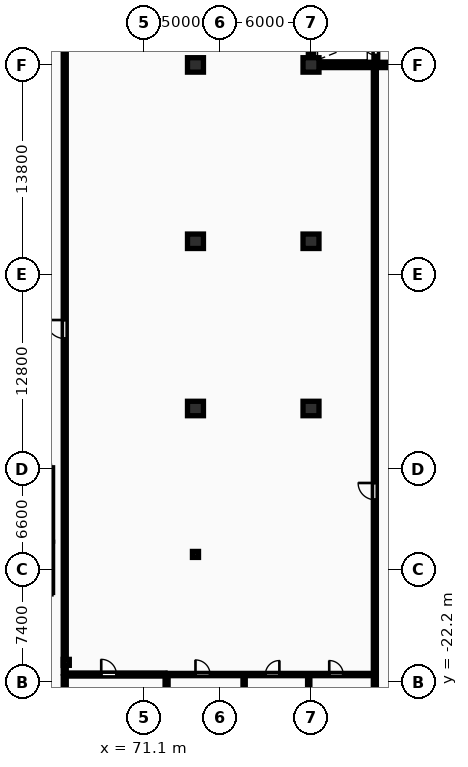
"""IFC4 building model, lengths in metres.
Left out: names, types, materials, properties, quantities, classifications, styles, units other than length and angle.
Written with IfcOpenShell. Run it as: python <this file> out.ifc"""

import sys

from ifc_helpers import new_model, si_unit, direction, frame, frame_2d, origin, origin_2d, place, context, subcontext, project, spatial, rectangle, i_section, extrude, element, fill, save


model = new_model("IFC4")
c1 = context("Model", 3, precision=1e-05, world=origin(), true_north=direction((0.0, 1.0)))
c2 = subcontext(c1, "Body", "Model", "MODEL_VIEW")
j1 = project(units=[si_unit("LENGTHUNIT", "METRE"), si_unit("PLANEANGLEUNIT", "RADIAN")], contexts=[c1])
p1 = place(None, origin())
s1 = spatial("IfcSite", under=j1, at=p1, CompositionType="ELEMENT")
p2 = place(p1, origin())
s2 = spatial("IfcBuilding", under=s1, at=p2, CompositionType="ELEMENT")
p3 = place(p2, origin())
s3 = spatial("IfcBuildingStorey", under=s2, at=p3, CompositionType="ELEMENT", Elevation=0.0)
for number, where, z_axis, x_axis in (
    (1, (74.5, -4.2, 0.0), (0.0, 0.0, 1.0), (1.0, 0.0, 0.0)),
    (2, (74.5, 6.8, 0.0), (0.0, 0.0, 1.0), (1.0, 0.0, 0.0)),
    (3, (74.5, 18.4, 0.0), (0.0, 0.0, 1.0), (1.0, 0.0, 0.0)),
    (4, (82.1, -4.2, 0.0), (0.0, 0.0, 1.0), (1.0, 0.0, 0.0)),
    (5, (82.1, 6.8, 0.0), (0.0, 0.0, 1.0), (1.0, 0.0, 0.0)),
    (6, (82.1, 18.4, 0.0), (0.0, 0.0, 1.0), (1.0, 0.0, 0.0)),
):
    element("IfcColumn", number, at=place(p3, frame(where, z_axis=z_axis, x_axis=x_axis)), inside=s3, PredefinedType="COLUMN", context=c2, shape_type="SweptSolid", body=[
        extrude(rectangle(XDim=1.05, YDim=0.95, at=origin_2d()), origin(), (0.0, 0.0, 1.0), 5.4),
    ])
for number, where, z_axis, x_axis in (
    (7, (74.5, -13.8, 0.0), (0.0, 0.0, 1.0), (1.0, 0.0, 0.0)),
    (8, (66.0, -20.9, 0.0), (0.0, 0.0, 1.0), (1.0, 0.0, 0.0)),
):
    element("IfcColumn", number, at=place(p3, frame(where, z_axis=z_axis, x_axis=x_axis)), inside=s3, PredefinedType="COLUMN", context=c2, shape_type="SweptSolid", body=[
        extrude(i_section(OverallWidth=0.399, OverallDepth=0.394, WebThickness=0.023, FlangeThickness=0.037, FilletRadius=0.015, at=origin_2d()), origin(), (0.0, 0.0, 1.0), 5.4),
    ])
p4 = place(p3, frame((82.1, 18.575, 0.0), z_axis=(0.0, 0.0, 1.0), x_axis=(0.0, 1.0, 0.0)))
e9 = element("IfcWall", 9, at=p4, inside=s3, PredefinedType="SHEAR", context=c2, shape_type="SweptSolid", body=[
    extrude(rectangle(XDim=11.65, YDim=0.35, at=frame_2d((5.825, 0.0))), origin(), (0.0, 0.0, 1.0), 5.4),
])
p5 = place(p3, frame((81.925, 18.4, 0.0), z_axis=(0.0, 0.0, 1.0), x_axis=(1.0, 0.0, 0.0)))
e10 = element("IfcWall", 10, at=p5, inside=s3, PredefinedType="SHEAR", context=c2, shape_type="SweptSolid", body=[
    extrude(rectangle(XDim=36.265, YDim=0.35, at=frame_2d((18.132, 0.0))), origin(), (0.0, 0.0, 1.0), 5.4),
])
p6 = place(p5, frame((5.675, 0.0, 0.0)))
e11 = element("IfcOpeningElement", 11, at=p6, cuts=e10, PredefinedType="OPENING", context=c2, shape_type="SweptSolid", body=[
    extrude(rectangle(XDim=1.0, YDim=2.15, at=frame_2d((0.5, 1.075))), frame((0.0, 0.185, 0.0), z_axis=(0.0, -1.0, 0.0), x_axis=(1.0, 0.0, 0.0)), (0.0, 0.0, 1.0), 0.37),
])
p7 = place(p5, frame((21.925, 0.0, 0.0)))
e12 = element("IfcOpeningElement", 12, at=p7, cuts=e10, PredefinedType="OPENING", context=c2, shape_type="SweptSolid", body=[
    extrude(rectangle(XDim=1.5, YDim=2.2, at=frame_2d((0.75, 1.1))), frame((0.0, 0.185, 0.0), z_axis=(0.0, -1.0, 0.0), x_axis=(1.0, 0.0, 0.0)), (0.0, 0.0, 1.0), 0.37),
])
p8 = place(p5, frame((29.875, 0.0, 0.0)))
e13 = element("IfcOpeningElement", 13, at=p8, cuts=e10, PredefinedType="OPENING", context=c2, shape_type="SweptSolid", body=[
    extrude(rectangle(XDim=1.0, YDim=2.15, at=frame_2d((0.5, 1.075))), frame((0.0, 0.185, 0.0), z_axis=(0.0, -1.0, 0.0), x_axis=(1.0, 0.0, 0.0)), (0.0, 0.0, 1.0), 0.37),
])
p9 = place(p3, frame((86.365, 18.6, 0.0), z_axis=(0.0, 0.0, 1.0), x_axis=(0.0, 1.0, 0.0)))
e14 = element("IfcWall", 14, at=p9, inside=s3, PredefinedType="SHEAR", context=c2, shape_type="SweptSolid", body=[
    extrude(rectangle(XDim=11.6, YDim=0.25, at=frame_2d((5.8, 0.0))), origin(), (0.0, 0.0, 1.0), 5.4),
])
p10 = place(p9, frame((0.45, 0.0, 0.0)))
e15 = element("IfcOpeningElement", 15, at=p10, cuts=e14, PredefinedType="OPENING", context=c2, shape_type="SweptSolid", body=[
    extrude(rectangle(XDim=0.85, YDim=2.05, at=frame_2d((0.425, 1.025))), frame((0.0, 0.135, 0.0), z_axis=(0.0, -1.0, 0.0), x_axis=(1.0, 0.0, 0.0)), (0.0, 0.0, 1.0), 0.27),
])
p11 = place(p9, frame((2.05, 0.0, 0.0)))
e16 = element("IfcOpeningElement", 16, at=p11, cuts=e14, PredefinedType="OPENING", context=c2, shape_type="SweptSolid", body=[
    extrude(rectangle(XDim=1.1, YDim=2.1, at=frame_2d((0.55, 1.05))), frame((0.0, 0.135, 0.0), z_axis=(0.0, -1.0, 0.0), x_axis=(1.0, 0.0, 0.0)), (0.0, 0.0, 1.0), 0.27),
])
p12 = place(p9, frame((9.95, 0.0, 0.0)))
e17 = element("IfcOpeningElement", 17, at=p12, cuts=e14, PredefinedType="OPENING", context=c2, shape_type="SweptSolid", body=[
    extrude(rectangle(XDim=0.85, YDim=2.05, at=frame_2d((0.425, 1.025))), frame((0.0, 0.135, 0.0), z_axis=(0.0, -1.0, 0.0), x_axis=(1.0, 0.0, 0.0)), (0.0, 0.0, 1.0), 0.27),
])
p13 = place(p3, frame((65.0, -12.925, 0.0), z_axis=(0.0, 0.0, 1.0), x_axis=(0.0, 1.0, 0.0)))
e18 = element("IfcWall", 18, at=p13, inside=s3, PredefinedType="PARTITIONING", context=c2, shape_type="SweptSolid", body=[
    extrude(rectangle(XDim=4.825, YDim=0.2, at=frame_2d((2.413, 0.0))), origin(), (0.0, 0.0, 1.0), 5.1),
])
p14 = place(p13, frame((1.6, 0.0, 0.0)))
e19 = element("IfcOpeningElement", 19, at=p14, cuts=e18, PredefinedType="OPENING", context=c2, shape_type="SweptSolid", body=[
    extrude(rectangle(XDim=1.1, YDim=2.15, at=frame_2d((0.55, 1.075))), frame((0.0, 0.11, 0.0), z_axis=(0.0, -1.0, 0.0), x_axis=(1.0, 0.0, 0.0)), (0.0, 0.0, 1.0), 0.22),
])
p15 = place(p3, frame((65.9, -21.7, 0.0), z_axis=(0.0, 0.0, 1.0), x_axis=(1.0, 0.0, 0.0)))
e20 = element("IfcWall", 20, at=p15, inside=s3, PredefinedType="PARTITIONING", context=c2, shape_type="SweptSolid", body=[
    extrude(rectangle(XDim=6.6, YDim=0.2, at=frame_2d((3.3, 0.0))), origin(), (0.0, 0.0, 1.0), 5.1),
])
p16 = place(p15, frame((2.4, 0.0, 0.0)))
e21 = element("IfcOpeningElement", 21, at=p16, cuts=e20, PredefinedType="OPENING", context=c2, shape_type="SweptSolid", body=[
    extrude(rectangle(XDim=1.0, YDim=2.1, at=frame_2d((0.5, 1.05))), frame((0.0, 0.11, 0.0), z_axis=(0.0, -1.0, 0.0), x_axis=(1.0, 0.0, 0.0)), (0.0, 0.0, 1.0), 0.22),
])
for number, where, z_axis, x_axis in (
    (22, (65.9, -26.2, 0.0), (0.0, 0.0, 1.0), (0.0, 1.0, 0.0)),
    (23, (72.6, -26.2, 0.0), (0.0, 0.0, 1.0), (0.0, 1.0, 0.0)),
):
    element("IfcWall", number, at=place(p3, frame(where, z_axis=z_axis, x_axis=x_axis)), inside=s3, PredefinedType="PARTITIONING", context=c2, shape_type="SweptSolid", body=[
        extrude(rectangle(XDim=4.35, YDim=0.2, at=frame_2d((2.175, 0.0))), origin(), (0.0, 0.0, 1.0), 5.1),
    ])
p17 = place(p3, frame((86.3, -26.2, 0.0), z_axis=(0.0, 0.0, 1.0), x_axis=(0.0, 1.0, 0.0)))
e24 = element("IfcWall", 24, at=p17, inside=s3, PredefinedType="PARTITIONING", context=c2, shape_type="SweptSolid", body=[
    extrude(rectangle(XDim=44.35, YDim=0.2, at=frame_2d((22.175, 0.0))), origin(), (0.0, 0.0, 1.0), 5.1),
])
p18 = place(p17, frame((16.0, 0.0, 0.0)))
e25 = element("IfcOpeningElement", 25, at=p18, cuts=e24, PredefinedType="OPENING", context=c2, shape_type="SweptSolid", body=[
    extrude(rectangle(XDim=1.1, YDim=2.1, at=frame_2d((0.55, 1.05))), frame((0.0, 0.11, 0.0), z_axis=(0.0, -1.0, 0.0), x_axis=(1.0, 0.0, 0.0)), (0.0, 0.0, 1.0), 0.22),
])
p19 = place(p3, frame((65.0, -16.3, 0.0), z_axis=(0.0, 0.0, 1.0), x_axis=(0.0, 1.0, 0.0)))
e26 = element("IfcWall", 26, at=p19, inside=s3, PredefinedType="PARTITIONING", context=c2, shape_type="SweptSolid", body=[
    extrude(rectangle(XDim=3.3, YDim=0.2, at=frame_2d((1.65, 0.0))), origin(), (0.0, 0.0, 1.0), 5.1),
])
p20 = place(p3, frame((72.7, -21.7, 0.0), z_axis=(0.0, 0.0, 1.0), x_axis=(1.0, 0.0, 0.0)))
e27 = element("IfcWall", 27, at=p20, inside=s3, PredefinedType="PARTITIONING", context=c2, shape_type="SweptSolid", body=[
    extrude(rectangle(XDim=13.5, YDim=0.15, at=frame_2d((6.75, 0.0))), origin(), (0.0, 0.0, 1.0), 5.1),
])
p21 = place(p20, frame((1.8, 0.0, 0.0)))
e28 = element("IfcOpeningElement", 28, at=p21, cuts=e27, PredefinedType="OPENING", context=c2, shape_type="SweptSolid", body=[
    extrude(rectangle(XDim=0.96, YDim=2.1, at=frame_2d((0.48, 1.05))), frame((0.0, 0.085, 0.0), z_axis=(0.0, -1.0, 0.0), x_axis=(1.0, 0.0, 0.0)), (0.0, 0.0, 1.0), 0.17),
])
p22 = place(p20, frame((6.4, 0.0, 0.0)))
e29 = element("IfcOpeningElement", 29, at=p22, cuts=e27, PredefinedType="OPENING", context=c2, shape_type="SweptSolid", body=[
    extrude(rectangle(XDim=0.92, YDim=2.08, at=frame_2d((0.46, 1.04))), frame((0.0, 0.085, 0.0), z_axis=(0.0, -1.0, 0.0), x_axis=(1.0, 0.0, 0.0)), (0.0, 0.0, 1.0), 0.17),
])
p23 = place(p20, frame((10.6, 0.0, 0.0)))
e30 = element("IfcOpeningElement", 30, at=p23, cuts=e27, PredefinedType="OPENING", context=c2, shape_type="SweptSolid", body=[
    extrude(rectangle(XDim=0.92, YDim=2.08, at=frame_2d((0.46, 1.04))), frame((0.0, 0.085, 0.0), z_axis=(0.0, -1.0, 0.0), x_axis=(1.0, 0.0, 0.0)), (0.0, 0.0, 1.0), 0.17),
])
for number, where, z_axis, x_axis in (
    (31, (77.7, -26.2, 0.0), (0.0, 0.0, 1.0), (0.0, 1.0, 0.0)),
    (32, (81.95, -26.2, 0.0), (0.0, 0.0, 1.0), (0.0, 1.0, 0.0)),
):
    element("IfcWall", number, at=place(p3, frame(where, z_axis=z_axis, x_axis=x_axis)), inside=s3, PredefinedType="PARTITIONING", context=c2, shape_type="SweptSolid", body=[
        extrude(rectangle(XDim=4.4, YDim=0.15, at=frame_2d((2.2, 0.0))), origin(), (0.0, 0.0, 1.0), 5.1),
    ])
p24 = place(p3, frame((65.9, -21.6, 0.0), z_axis=(0.0, 0.0, 1.0), x_axis=(0.0, 1.0, 0.0)))
e33 = element("IfcWall", 33, at=p24, inside=s3, PredefinedType="PARTITIONING", context=c2, shape_type="SweptSolid", body=[
    extrude(rectangle(XDim=53.15, YDim=0.2, at=frame_2d((26.575, 0.0))), origin(), (0.0, 0.0, 1.0), 5.1),
])
p25 = place(p24, frame((22.0, 0.0, 0.0)))
e34 = element("IfcOpeningElement", 34, at=p25, cuts=e33, PredefinedType="OPENING", context=c2, shape_type="SweptSolid", body=[
    extrude(rectangle(XDim=1.22, YDim=2.18, at=frame_2d((0.61, 1.09))), frame((0.0, 0.11, 0.0), z_axis=(0.0, -1.0, 0.0), x_axis=(1.0, 0.0, 0.0)), (0.0, 0.0, 1.0), 0.22),
])
p26 = place(p10, origin())
e35 = element("IfcDoor", 35, at=p26, inside=s3, OperationType="SINGLE_SWING_RIGHT", PredefinedType="DOOR", context=c2, shape_type="SweptSolid", body=[
    extrude(rectangle(XDim=0.85, YDim=2.05, at=frame_2d((0.425, 1.025))), frame((0.0, 0.025, 0.0), z_axis=(0.0, -1.0, 0.0), x_axis=(1.0, 0.0, 0.0)), (0.0, 0.0, 1.0), 0.05),
])
fill(e15, e35)
p27 = place(p16, origin())
e36 = element("IfcDoor", 36, at=p27, inside=s3, OperationType="SINGLE_SWING_LEFT", PredefinedType="DOOR", context=c2, shape_type="SweptSolid", body=[
    extrude(rectangle(XDim=1.0, YDim=2.1, at=frame_2d((0.5, 1.05))), frame((0.0, 0.025, 0.0), z_axis=(0.0, -1.0, 0.0), x_axis=(1.0, 0.0, 0.0)), (0.0, 0.0, 1.0), 0.05),
])
fill(e21, e36)
p28 = place(p18, origin())
e37 = element("IfcDoor", 37, at=p28, inside=s3, OperationType="SINGLE_SWING_RIGHT", PredefinedType="DOOR", context=c2, shape_type="SweptSolid", body=[
    extrude(rectangle(XDim=1.1, YDim=2.1, at=frame_2d((0.55, 1.05))), frame((0.0, 0.025, 0.0), z_axis=(0.0, -1.0, 0.0), x_axis=(1.0, 0.0, 0.0)), (0.0, 0.0, 1.0), 0.05),
])
fill(e25, e37)
p29 = place(p21, origin())
e38 = element("IfcDoor", 38, at=p29, inside=s3, OperationType="SINGLE_SWING_LEFT", PredefinedType="DOOR", context=c2, shape_type="SweptSolid", body=[
    extrude(rectangle(XDim=0.96, YDim=2.1, at=frame_2d((0.48, 1.05))), frame((0.0, 0.025, 0.0), z_axis=(0.0, -1.0, 0.0), x_axis=(1.0, 0.0, 0.0)), (0.0, 0.0, 1.0), 0.05),
])
fill(e28, e38)
p30 = place(p22, origin())
e39 = element("IfcDoor", 39, at=p30, inside=s3, OperationType="SINGLE_SWING_RIGHT", PredefinedType="DOOR", context=c2, shape_type="SweptSolid", body=[
    extrude(rectangle(XDim=0.92, YDim=2.08, at=frame_2d((0.46, 1.04))), frame((0.0, 0.025, 0.0), z_axis=(0.0, -1.0, 0.0), x_axis=(1.0, 0.0, 0.0)), (0.0, 0.0, 1.0), 0.05),
])
fill(e29, e39)
p31 = place(p23, origin())
e40 = element("IfcDoor", 40, at=p31, inside=s3, OperationType="SINGLE_SWING_LEFT", PredefinedType="DOOR", context=c2, shape_type="SweptSolid", body=[
    extrude(rectangle(XDim=0.92, YDim=2.08, at=frame_2d((0.46, 1.04))), frame((0.0, 0.025, 0.0), z_axis=(0.0, -1.0, 0.0), x_axis=(1.0, 0.0, 0.0)), (0.0, 0.0, 1.0), 0.05),
])
fill(e30, e40)
p32 = place(p25, origin())
e41 = element("IfcDoor", 41, at=p32, inside=s3, OperationType="SINGLE_SWING_RIGHT", PredefinedType="DOOR", context=c2, shape_type="SweptSolid", body=[
    extrude(rectangle(XDim=1.22, YDim=2.18, at=frame_2d((0.61, 1.09))), frame((0.0, 0.025, 0.0), z_axis=(0.0, -1.0, 0.0), x_axis=(1.0, 0.0, 0.0)), (0.0, 0.0, 1.0), 0.05),
])
fill(e34, e41)
save(model, sys.argv[1])
